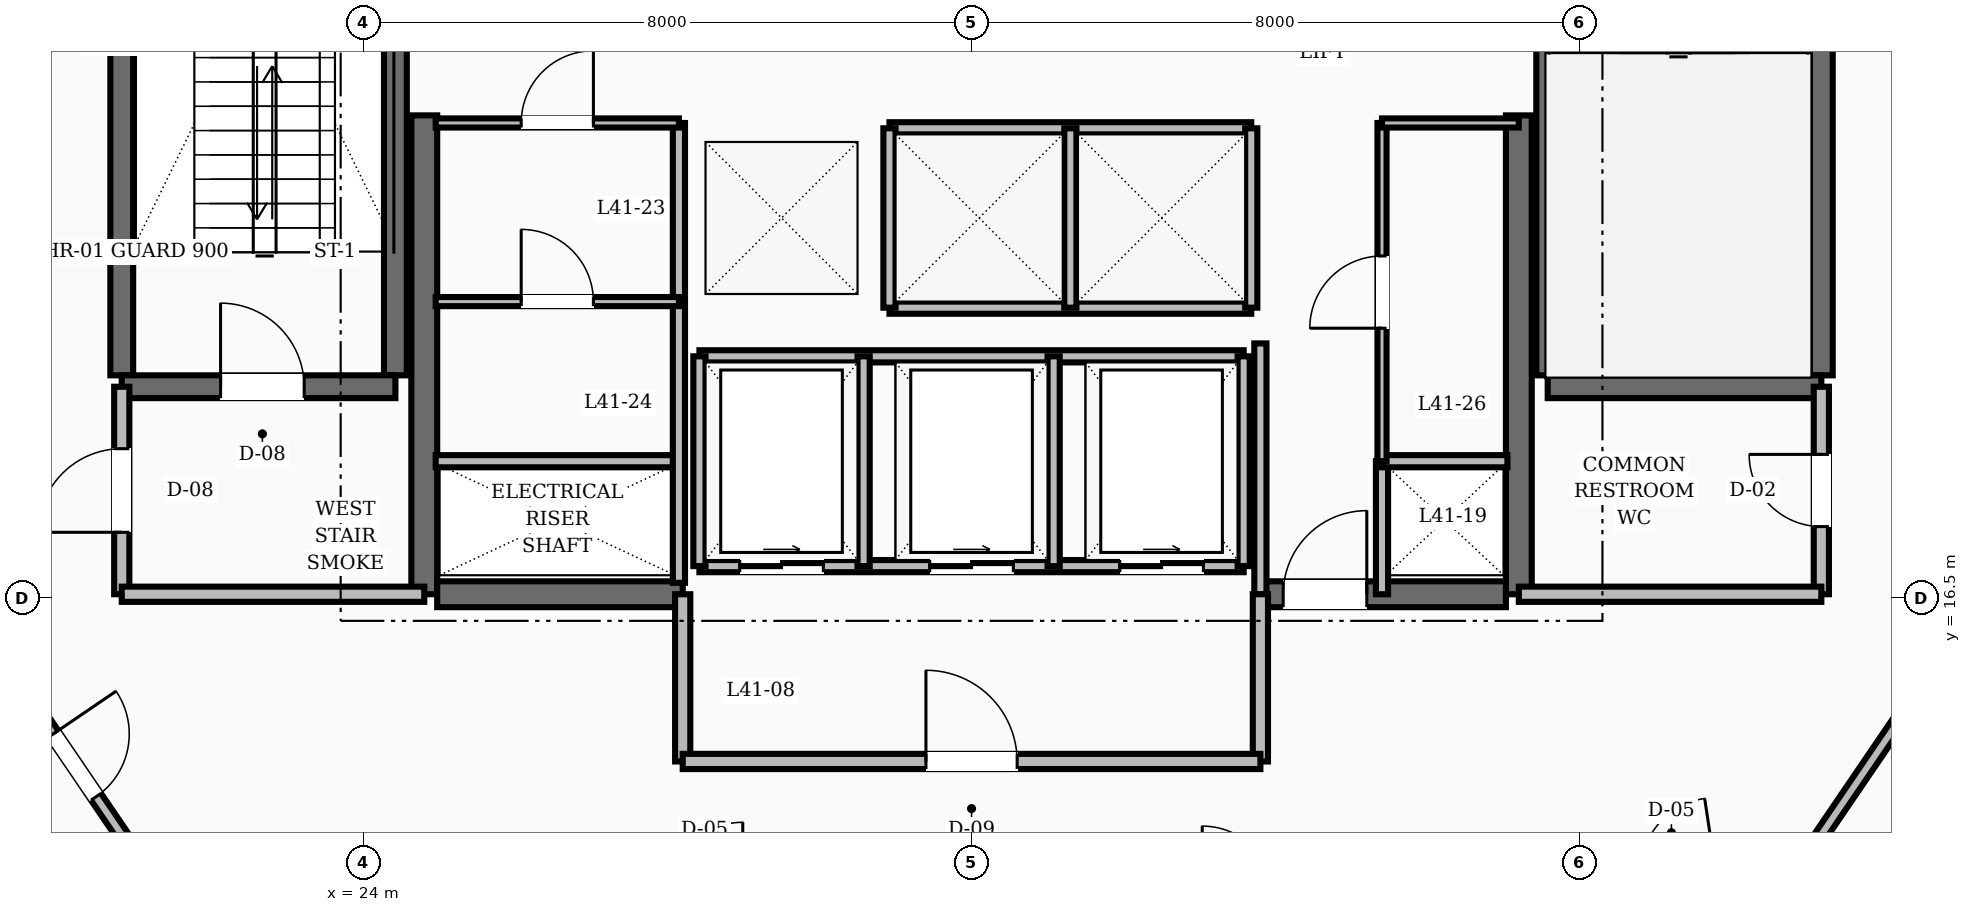
"""IFC4 building model, lengths in metres.
Left out: names, types, materials, properties, quantities, classifications, styles, units other than length and angle.
Written with IfcOpenShell. Run it as: python <this file> out.ifc"""

import sys

from ifc_helpers import new_model, si_unit, direction, frame, frame_2d, origin, place, context, subcontext, project, spatial, rectangle, extrude, element, fill, save


model = new_model("IFC4")
c1 = context("Model", 3, precision=1e-05, world=origin(), true_north=direction((0.0, 1.0)))
c2 = subcontext(c1, "Body", "Model", "MODEL_VIEW")
j1 = project(units=[si_unit("LENGTHUNIT", "METRE"), si_unit("PLANEANGLEUNIT", "RADIAN")], contexts=[c1])
p1 = place(None, origin())
s1 = spatial("IfcSite", under=j1, at=p1, CompositionType="ELEMENT")
p2 = place(p1, origin())
s2 = spatial("IfcBuilding", under=s1, at=p2, CompositionType="ELEMENT")
p3 = place(p2, frame((0.0, 0.0, 160.4)))
s3 = spatial("IfcBuildingStorey", under=s2, at=p3, CompositionType="ELEMENT", Elevation=160.4)
for number, where, z_axis, x_axis in (
    (1, (24.8, 16.55, 0.0), (0.0, 0.0, 1.0), (0.0, 1.0, 0.0)),
    (2, (39.2, 16.55, 0.0), (0.0, 0.0, 1.0), (0.0, 1.0, 0.0)),
):
    element("IfcWall", number, at=place(p3, frame(where, z_axis=z_axis, x_axis=x_axis)), inside=s3, PredefinedType="SHEAR", context=c2, shape_type="SweptSolid", body=[
        extrude(rectangle(XDim=6.3, YDim=0.34, at=frame_2d((3.15, 0.0))), origin(), (0.0, 0.0, 1.0), 3.6),
    ])
p4 = place(p3, frame((24.97, 16.55, 0.0), z_axis=(0.0, 0.0, 1.0), x_axis=(1.0, 0.0, 0.0)))
e3 = element("IfcWall", 3, at=p4, inside=s3, PredefinedType="SHEAR", context=c2, shape_type="SweptSolid", body=[
    extrude(rectangle(XDim=3.23, YDim=0.34, at=frame_2d((1.615, 0.0))), origin(), (0.0, 0.0, 1.0), 3.6),
])
p5 = place(p3, frame((35.8, 16.55, 0.0), z_axis=(0.0, 0.0, 1.0), x_axis=(1.0, 0.0, 0.0)))
e4 = element("IfcWall", 4, at=p5, inside=s3, PredefinedType="SHEAR", context=c2, shape_type="SweptSolid", body=[
    extrude(rectangle(XDim=3.23, YDim=0.34, at=frame_2d((1.615, 0.0))), origin(), (0.0, 0.0, 1.0), 3.6),
])
p6 = place(p5, frame((0.3, 0.0, 0.0)))
e5 = element("IfcOpeningElement", 5, at=p6, cuts=e4, PredefinedType="OPENING", context=c2, shape_type="SweptSolid", body=[
    extrude(rectangle(XDim=1.1, YDim=2.1, at=frame_2d((0.55, 1.05))), frame((0.0, 0.18, 0.0), z_axis=(0.0, -1.0, 0.0), x_axis=(1.0, 0.0, 0.0)), (0.0, 0.0, 1.0), 0.36),
])
for number, where, z_axis, x_axis in (
    (6, (20.82, 19.43, 0.0), (0.0, 0.0, 1.0), (0.0, 1.0, 0.0)),
    (7, (24.42, 19.43, 0.0), (0.0, 0.0, 1.0), (0.0, 1.0, 0.0)),
):
    element("IfcWall", number, at=place(p3, frame(where, z_axis=z_axis, x_axis=x_axis)), inside=s3, PredefinedType="SHEAR", context=c2, shape_type="SweptSolid", body=[
        extrude(rectangle(XDim=8.74, YDim=0.3, at=frame_2d((4.37, 0.0))), origin(), (0.0, 0.0, 1.0), 3.6),
    ])
p7 = place(p3, frame((20.82, 19.28, 0.0), z_axis=(0.0, 0.0, 1.0), x_axis=(1.0, 0.0, 0.0)))
e8 = element("IfcWall", 8, at=p7, inside=s3, PredefinedType="SHEAR", context=c2, shape_type="SweptSolid", body=[
    extrude(rectangle(XDim=3.6, YDim=0.3, at=frame_2d((1.8, 0.0))), origin(), (0.0, 0.0, 1.0), 3.6),
])
p8 = place(p7, frame((1.3, 0.0, 0.0)))
e9 = element("IfcOpeningElement", 9, at=p8, cuts=e8, PredefinedType="OPENING", context=c2, shape_type="SweptSolid", body=[
    extrude(rectangle(XDim=1.1, YDim=2.1, at=frame_2d((0.55, 1.05))), frame((0.0, 0.16, 0.0), z_axis=(0.0, -1.0, 0.0), x_axis=(1.0, 0.0, 0.0)), (0.0, 0.0, 1.0), 0.32),
])
for number, where, z_axis, x_axis in (
    (10, (43.18, 19.43, 0.0), (0.0, 0.0, 1.0), (0.0, 1.0, 0.0)),
    (11, (39.58, 19.43, 0.0), (0.0, 0.0, 1.0), (0.0, 1.0, 0.0)),
):
    element("IfcWall", number, at=place(p3, frame(where, z_axis=z_axis, x_axis=x_axis)), inside=s3, PredefinedType="SHEAR", context=c2, shape_type="SweptSolid", body=[
        extrude(rectangle(XDim=8.74, YDim=0.3, at=frame_2d((4.37, 0.0))), origin(), (0.0, 0.0, 1.0), 3.6),
    ])
p9 = place(p3, frame((39.58, 19.28, 0.0), z_axis=(0.0, 0.0, 1.0), x_axis=(1.0, 0.0, 0.0)))
e12 = element("IfcWall", 12, at=p9, inside=s3, PredefinedType="SHEAR", context=c2, shape_type="SweptSolid", body=[
    extrude(rectangle(XDim=3.6, YDim=0.3, at=frame_2d((1.8, 0.0))), origin(), (0.0, 0.0, 1.0), 3.6),
])
p10 = place(p3, frame((20.82, 16.55, 0.0), z_axis=(0.0, 0.0, 1.0), x_axis=(0.0, 1.0, 0.0)))
e13 = element("IfcWall", 13, at=p10, inside=s3, PredefinedType="SOLIDWALL", context=c2, shape_type="SweptSolid", body=[
    extrude(rectangle(XDim=2.73, YDim=0.2, at=frame_2d((1.365, 0.0))), origin(), (0.0, 0.0, 1.0), 2.8),
])
p11 = place(p10, frame((0.815, 0.0, 0.0)))
e14 = element("IfcOpeningElement", 14, at=p11, cuts=e13, PredefinedType="OPENING", context=c2, shape_type="SweptSolid", body=[
    extrude(rectangle(XDim=1.1, YDim=2.1, at=frame_2d((0.55, 1.05))), frame((0.0, 0.11, 0.0), z_axis=(0.0, -1.0, 0.0), x_axis=(1.0, 0.0, 0.0)), (0.0, 0.0, 1.0), 0.22),
])
p12 = place(p3, frame((20.82, 16.55, 0.0), z_axis=(0.0, 0.0, 1.0), x_axis=(1.0, 0.0, 0.0)))
e15 = element("IfcWall", 15, at=p12, inside=s3, PredefinedType="SOLIDWALL", context=c2, shape_type="SweptSolid", body=[
    extrude(rectangle(XDim=3.98, YDim=0.2, at=frame_2d((1.99, 0.0))), origin(), (0.0, 0.0, 1.0), 2.8),
])
p13 = place(p3, frame((43.18, 16.55, 0.0), z_axis=(0.0, 0.0, 1.0), x_axis=(0.0, 1.0, 0.0)))
e16 = element("IfcWall", 16, at=p13, inside=s3, PredefinedType="SOLIDWALL", context=c2, shape_type="SweptSolid", body=[
    extrude(rectangle(XDim=2.73, YDim=0.2, at=frame_2d((1.365, 0.0))), origin(), (0.0, 0.0, 1.0), 2.8),
])
p14 = place(p13, frame((0.89, 0.0, 0.0)))
e17 = element("IfcOpeningElement", 17, at=p14, cuts=e16, PredefinedType="OPENING", context=c2, shape_type="SweptSolid", body=[
    extrude(rectangle(XDim=0.95, YDim=2.1, at=frame_2d((0.475, 1.05))), frame((0.0, 0.11, 0.0), z_axis=(0.0, -1.0, 0.0), x_axis=(1.0, 0.0, 0.0)), (0.0, 0.0, 1.0), 0.22),
])
p15 = place(p3, frame((39.2, 16.55, 0.0), z_axis=(0.0, 0.0, 1.0), x_axis=(1.0, 0.0, 0.0)))
e18 = element("IfcWall", 18, at=p15, inside=s3, PredefinedType="SOLIDWALL", context=c2, shape_type="SweptSolid", body=[
    extrude(rectangle(XDim=3.98, YDim=0.2, at=frame_2d((1.99, 0.0))), origin(), (0.0, 0.0, 1.0), 2.8),
])
p16 = place(p3, frame((35.8, 16.55, 0.0), z_axis=(0.0, 0.0, 1.0), x_axis=(0.0, 1.0, 0.0)))
e19 = element("IfcWall", 19, at=p16, inside=s3, PredefinedType="SOLIDWALL", context=c2, shape_type="SweptSolid", body=[
    extrude(rectangle(XDim=3.3, YDim=0.16, at=frame_2d((1.65, 0.0))), origin(), (0.0, 0.0, 1.0), 2.8),
])
p17 = place(p3, frame((37.4, 16.55, 0.0), z_axis=(0.0, 0.0, 1.0), x_axis=(0.0, 1.0, 0.0)))
e20 = element("IfcWall", 20, at=p17, inside=s3, PredefinedType="SOLIDWALL", context=c2, shape_type="SweptSolid", body=[
    extrude(rectangle(XDim=1.75, YDim=0.16, at=frame_2d((0.875, 0.0))), origin(), (0.0, 0.0, 1.0), 2.8),
])
for number, where, z_axis, x_axis in (
    (21, (28.2, 14.35, 0.0), (0.0, 0.0, 1.0), (0.0, 1.0, 0.0)),
    (22, (35.8, 14.35, 0.0), (0.0, 0.0, 1.0), (0.0, 1.0, 0.0)),
):
    element("IfcWall", number, at=place(p3, frame(where, z_axis=z_axis, x_axis=x_axis)), inside=s3, PredefinedType="SOLIDWALL", context=c2, shape_type="SweptSolid", body=[
        extrude(rectangle(XDim=2.2, YDim=0.2, at=frame_2d((1.1, 0.0))), origin(), (0.0, 0.0, 1.0), 2.8),
    ])
p18 = place(p3, frame((28.2, 14.35, 0.0), z_axis=(0.0, 0.0, 1.0), x_axis=(1.0, 0.0, 0.0)))
e23 = element("IfcWall", 23, at=p18, inside=s3, PredefinedType="SOLIDWALL", context=c2, shape_type="SweptSolid", body=[
    extrude(rectangle(XDim=7.6, YDim=0.2, at=frame_2d((3.8, 0.0))), origin(), (0.0, 0.0, 1.0), 2.8),
])
p19 = place(p18, frame((3.2, 0.0, 0.0)))
e24 = element("IfcOpeningElement", 24, at=p19, cuts=e23, PredefinedType="OPENING", context=c2, shape_type="SweptSolid", body=[
    extrude(rectangle(XDim=1.2, YDim=2.1, at=frame_2d((0.6, 1.05))), frame((0.0, 0.11, 0.0), z_axis=(0.0, -1.0, 0.0), x_axis=(1.0, 0.0, 0.0)), (0.0, 0.0, 1.0), 0.22),
])
for number, where, z_axis, x_axis in (
    (25, (30.92, 22.68, 0.0), (0.0, 0.0, 1.0), (1.0, 0.0, 0.0)),
    (26, (30.92, 20.32, 0.0), (0.0, 0.0, 1.0), (1.0, 0.0, 0.0)),
):
    element("IfcWall", number, at=place(p3, frame(where, z_axis=z_axis, x_axis=x_axis)), inside=s3, PredefinedType="SOLIDWALL", context=c2, shape_type="SweptSolid", body=[
        extrude(rectangle(XDim=4.76, YDim=0.16, at=frame_2d((2.38, 0.0))), origin(), (0.0, 0.0, 1.0), 2.8),
    ])
for number, where, z_axis, x_axis in (
    (27, (30.92, 20.32, 0.0), (0.0, 0.0, 1.0), (0.0, 1.0, 0.0)),
    (28, (33.3, 20.32, 0.0), (0.0, 0.0, 1.0), (0.0, 1.0, 0.0)),
    (29, (35.68, 20.32, 0.0), (0.0, 0.0, 1.0), (0.0, 1.0, 0.0)),
):
    element("IfcWall", number, at=place(p3, frame(where, z_axis=z_axis, x_axis=x_axis)), inside=s3, PredefinedType="SOLIDWALL", context=c2, shape_type="SweptSolid", body=[
        extrude(rectangle(XDim=2.36, YDim=0.16, at=frame_2d((1.18, 0.0))), origin(), (0.0, 0.0, 1.0), 2.8),
    ])
p20 = place(p3, frame((28.42, 16.92, 0.0), z_axis=(0.0, 0.0, 1.0), x_axis=(1.0, 0.0, 0.0)))
e30 = element("IfcWall", 30, at=p20, inside=s3, PredefinedType="SOLIDWALL", context=c2, shape_type="SweptSolid", body=[
    extrude(rectangle(XDim=7.16, YDim=0.16, at=frame_2d((3.58, 0.0))), origin(), (0.0, 0.0, 1.0), 2.8),
])
p21 = place(p20, frame((0.53, 0.0, 0.0)))
e31 = element("IfcOpeningElement", 31, at=p21, cuts=e30, PredefinedType="OPENING", context=c2, shape_type="SweptSolid", body=[
    extrude(rectangle(XDim=1.1, YDim=2.15, at=frame_2d((0.55, 1.075))), frame((0.0, 0.09, 0.0), z_axis=(0.0, -1.0, 0.0), x_axis=(1.0, 0.0, 0.0)), (0.0, 0.0, 1.0), 0.18),
])
p22 = place(p20, frame((3.03, 0.0, 0.0)))
e32 = element("IfcOpeningElement", 32, at=p22, cuts=e30, PredefinedType="OPENING", context=c2, shape_type="SweptSolid", body=[
    extrude(rectangle(XDim=1.1, YDim=2.15, at=frame_2d((0.55, 1.075))), frame((0.0, 0.09, 0.0), z_axis=(0.0, -1.0, 0.0), x_axis=(1.0, 0.0, 0.0)), (0.0, 0.0, 1.0), 0.18),
])
p23 = place(p20, frame((5.53, 0.0, 0.0)))
e33 = element("IfcOpeningElement", 33, at=p23, cuts=e30, PredefinedType="OPENING", context=c2, shape_type="SweptSolid", body=[
    extrude(rectangle(XDim=1.1, YDim=2.15, at=frame_2d((0.55, 1.075))), frame((0.0, 0.09, 0.0), z_axis=(0.0, -1.0, 0.0), x_axis=(1.0, 0.0, 0.0)), (0.0, 0.0, 1.0), 0.18),
])
p24 = place(p3, frame((28.42, 19.68, 0.0), z_axis=(0.0, 0.0, 1.0), x_axis=(1.0, 0.0, 0.0)))
e34 = element("IfcWall", 34, at=p24, inside=s3, PredefinedType="SOLIDWALL", context=c2, shape_type="SweptSolid", body=[
    extrude(rectangle(XDim=7.16, YDim=0.16, at=frame_2d((3.58, 0.0))), origin(), (0.0, 0.0, 1.0), 2.8),
])
for number, where, z_axis, x_axis in (
    (35, (28.42, 16.92, 0.0), (0.0, 0.0, 1.0), (0.0, 1.0, 0.0)),
    (36, (30.58, 16.92, 0.0), (0.0, 0.0, 1.0), (0.0, 1.0, 0.0)),
    (37, (33.08, 16.92, 0.0), (0.0, 0.0, 1.0), (0.0, 1.0, 0.0)),
    (38, (35.58, 16.92, 0.0), (0.0, 0.0, 1.0), (0.0, 1.0, 0.0)),
):
    element("IfcWall", number, at=place(p3, frame(where, z_axis=z_axis, x_axis=x_axis)), inside=s3, PredefinedType="SOLIDWALL", context=c2, shape_type="SweptSolid", body=[
        extrude(rectangle(XDim=2.76, YDim=0.16, at=frame_2d((1.38, 0.0))), origin(), (0.0, 0.0, 1.0), 2.8),
    ])
p25 = place(p3, frame((24.95, 18.3, 0.0), z_axis=(0.0, 0.0, 1.0), x_axis=(1.0, 0.0, 0.0)))
e39 = element("IfcWall", 39, at=p25, inside=s3, PredefinedType="SOLIDWALL", context=c2, shape_type="SweptSolid", body=[
    extrude(rectangle(XDim=3.2, YDim=0.16, at=frame_2d((1.6, 0.0))), origin(), (0.0, 0.0, 1.0), 2.8),
])
p26 = place(p3, frame((28.15, 16.7, 0.0), z_axis=(0.0, 0.0, 1.0), x_axis=(0.0, 1.0, 0.0)))
e40 = element("IfcWall", 40, at=p26, inside=s3, PredefinedType="SOLIDWALL", context=c2, shape_type="SweptSolid", body=[
    extrude(rectangle(XDim=6.05, YDim=0.16, at=frame_2d((3.025, 0.0))), origin(), (0.0, 0.0, 1.0), 2.8),
])
p27 = place(p3, frame((37.4, 18.3, 0.0), z_axis=(0.0, 0.0, 1.0), x_axis=(1.0, 0.0, 0.0)))
e41 = element("IfcWall", 41, at=p27, inside=s3, PredefinedType="SOLIDWALL", context=c2, shape_type="SweptSolid", body=[
    extrude(rectangle(XDim=1.65, YDim=0.16, at=frame_2d((0.825, 0.0))), origin(), (0.0, 0.0, 1.0), 2.8),
])
p28 = place(p3, frame((24.95, 22.75, 0.0), z_axis=(0.0, 0.0, 1.0), x_axis=(1.0, 0.0, 0.0)))
e42 = element("IfcWall", 42, at=p28, inside=s3, PredefinedType="PARTITIONING", context=c2, shape_type="SweptSolid", body=[
    extrude(rectangle(XDim=3.2, YDim=0.12, at=frame_2d((1.6, 0.0))), origin(), (0.0, 0.0, 1.0), 2.8),
])
p29 = place(p28, frame((1.125, 0.0, 0.0)))
e43 = element("IfcOpeningElement", 43, at=p29, cuts=e42, PredefinedType="OPENING", context=c2, shape_type="SweptSolid", body=[
    extrude(rectangle(XDim=0.95, YDim=2.1, at=frame_2d((0.475, 1.05))), frame((0.0, 0.07, 0.0), z_axis=(0.0, -1.0, 0.0), x_axis=(1.0, 0.0, 0.0)), (0.0, 0.0, 1.0), 0.14),
])
p30 = place(p3, frame((37.4, 18.3, 0.0), z_axis=(0.0, 0.0, 1.0), x_axis=(0.0, 1.0, 0.0)))
e44 = element("IfcWall", 44, at=p30, inside=s3, PredefinedType="PARTITIONING", context=c2, shape_type="SweptSolid", body=[
    extrude(rectangle(XDim=4.45, YDim=0.12, at=frame_2d((2.225, 0.0))), origin(), (0.0, 0.0, 1.0), 2.8),
])
p31 = place(p30, frame((1.75, 0.0, 0.0)))
e45 = element("IfcOpeningElement", 45, at=p31, cuts=e44, PredefinedType="OPENING", context=c2, shape_type="SweptSolid", body=[
    extrude(rectangle(XDim=0.95, YDim=2.1, at=frame_2d((0.475, 1.05))), frame((0.0, 0.07, 0.0), z_axis=(0.0, -1.0, 0.0), x_axis=(1.0, 0.0, 0.0)), (0.0, 0.0, 1.0), 0.14),
])
p32 = place(p3, frame((37.4, 22.75, 0.0), z_axis=(0.0, 0.0, 1.0), x_axis=(1.0, 0.0, 0.0)))
e46 = element("IfcWall", 46, at=p32, inside=s3, PredefinedType="PARTITIONING", context=c2, shape_type="SweptSolid", body=[
    extrude(rectangle(XDim=1.8, YDim=0.12, at=frame_2d((0.9, 0.0))), origin(), (0.0, 0.0, 1.0), 2.8),
])
p33 = place(p3, frame((24.95, 20.4, 0.0), z_axis=(0.0, 0.0, 1.0), x_axis=(1.0, 0.0, 0.0)))
e47 = element("IfcWall", 47, at=p33, inside=s3, PredefinedType="PARTITIONING", context=c2, shape_type="SweptSolid", body=[
    extrude(rectangle(XDim=3.2, YDim=0.12, at=frame_2d((1.6, 0.0))), origin(), (0.0, 0.0, 1.0), 2.8),
])
p34 = place(p33, frame((1.125, 0.0, 0.0)))
e48 = element("IfcOpeningElement", 48, at=p34, cuts=e47, PredefinedType="OPENING", context=c2, shape_type="SweptSolid", body=[
    extrude(rectangle(XDim=0.95, YDim=2.1, at=frame_2d((0.475, 1.05))), frame((0.0, 0.07, 0.0), z_axis=(0.0, -1.0, 0.0), x_axis=(1.0, 0.0, 0.0)), (0.0, 0.0, 1.0), 0.14),
])
p35 = place(p3, frame((19.35, 15.548, 0.0), z_axis=(0.0, 0.0, 1.0), x_axis=(0.562674669208, -0.826678423955, 0.0)))
e49 = element("IfcWall", 49, at=p35, inside=s3, PredefinedType="SOLIDWALL", context=c2, shape_type="SweptSolid", body=[
    extrude(rectangle(XDim=3.021, YDim=0.16, at=frame_2d((1.511, 0.0))), origin(), (0.0, 0.0, 1.0), 2.8),
])
p36 = place(p35, frame((1.01, 0.0, 0.0)))
e50 = element("IfcOpeningElement", 50, at=p36, cuts=e49, PredefinedType="OPENING", context=c2, shape_type="SweptSolid", body=[
    extrude(rectangle(XDim=1.0, YDim=2.1, at=frame_2d((0.5, 1.05))), frame((0.0, 0.09, 0.0), z_axis=(0.0, -1.0, 0.0), x_axis=(1.0, 0.0, 0.0)), (0.0, 0.0, 1.0), 0.18),
])
p37 = place(p3, frame((42.95, 13.05, 0.0), z_axis=(0.0, 0.0, 1.0), x_axis=(0.562674669208, 0.826678423955, 0.0)))
e51 = element("IfcWall", 51, at=p37, inside=s3, PredefinedType="SOLIDWALL", context=c2, shape_type="SweptSolid", body=[
    extrude(rectangle(XDim=3.021, YDim=0.16, at=frame_2d((1.511, 0.0))), origin(), (0.0, 0.0, 1.0), 2.8),
])
p38 = place(p8, origin())
e52 = element("IfcDoor", 52, at=p38, inside=s3, OperationType="SINGLE_SWING_LEFT", PredefinedType="DOOR", context=c2, shape_type="SweptSolid", body=[
    extrude(rectangle(XDim=1.1, YDim=2.1, at=frame_2d((0.55, 1.05))), frame((0.0, 0.025, 0.0), z_axis=(0.0, -1.0, 0.0), x_axis=(1.0, 0.0, 0.0)), (0.0, 0.0, 1.0), 0.05),
])
fill(e9, e52)
p39 = place(p11, origin())
e53 = element("IfcDoor", 53, at=p39, inside=s3, OperationType="SINGLE_SWING_LEFT", PredefinedType="DOOR", context=c2, shape_type="SweptSolid", body=[
    extrude(rectangle(XDim=1.1, YDim=2.1, at=frame_2d((0.55, 1.05))), frame((0.0, 0.025, 0.0), z_axis=(0.0, -1.0, 0.0), x_axis=(1.0, 0.0, 0.0)), (0.0, 0.0, 1.0), 0.05),
])
fill(e14, e53)
p40 = place(p14, origin())
e54 = element("IfcDoor", 54, at=p40, inside=s3, OperationType="SINGLE_SWING_RIGHT", PredefinedType="DOOR", context=c2, shape_type="SweptSolid", body=[
    extrude(rectangle(XDim=0.95, YDim=2.1, at=frame_2d((0.475, 1.05))), frame((0.0, 0.025, 0.0), z_axis=(0.0, -1.0, 0.0), x_axis=(1.0, 0.0, 0.0)), (0.0, 0.0, 1.0), 0.05),
])
fill(e17, e54)
p41 = place(p6, origin())
e55 = element("IfcDoor", 55, at=p41, inside=s3, OperationType="SINGLE_SWING_RIGHT", PredefinedType="DOOR", context=c2, shape_type="SweptSolid", body=[
    extrude(rectangle(XDim=1.1, YDim=2.1, at=frame_2d((0.55, 1.05))), frame((0.0, 0.025, 0.0), z_axis=(0.0, -1.0, 0.0), x_axis=(1.0, 0.0, 0.0)), (0.0, 0.0, 1.0), 0.05),
])
fill(e5, e55)
p42 = place(p19, origin())
e56 = element("IfcDoor", 56, at=p42, inside=s3, OperationType="SINGLE_SWING_LEFT", PredefinedType="DOOR", context=c2, shape_type="SweptSolid", body=[
    extrude(rectangle(XDim=1.2, YDim=2.1, at=frame_2d((0.6, 1.05))), frame((0.0, 0.025, 0.0), z_axis=(0.0, -1.0, 0.0), x_axis=(1.0, 0.0, 0.0)), (0.0, 0.0, 1.0), 0.05),
])
fill(e24, e56)
p43 = place(p21, origin())
e57 = element("IfcDoor", 57, at=p43, inside=s3, OperationType="SLIDING_TO_RIGHT", PredefinedType="DOOR", context=c2, shape_type="SweptSolid", body=[
    extrude(rectangle(XDim=1.1, YDim=2.15, at=frame_2d((0.55, 1.075))), frame((0.0, 0.025, 0.0), z_axis=(0.0, -1.0, 0.0), x_axis=(1.0, 0.0, 0.0)), (0.0, 0.0, 1.0), 0.05),
])
fill(e31, e57)
p44 = place(p22, origin())
e58 = element("IfcDoor", 58, at=p44, inside=s3, OperationType="SLIDING_TO_RIGHT", PredefinedType="DOOR", context=c2, shape_type="SweptSolid", body=[
    extrude(rectangle(XDim=1.1, YDim=2.15, at=frame_2d((0.55, 1.075))), frame((0.0, 0.025, 0.0), z_axis=(0.0, -1.0, 0.0), x_axis=(1.0, 0.0, 0.0)), (0.0, 0.0, 1.0), 0.05),
])
fill(e32, e58)
p45 = place(p23, origin())
e59 = element("IfcDoor", 59, at=p45, inside=s3, OperationType="SLIDING_TO_RIGHT", PredefinedType="DOOR", context=c2, shape_type="SweptSolid", body=[
    extrude(rectangle(XDim=1.1, YDim=2.15, at=frame_2d((0.55, 1.075))), frame((0.0, 0.025, 0.0), z_axis=(0.0, -1.0, 0.0), x_axis=(1.0, 0.0, 0.0)), (0.0, 0.0, 1.0), 0.05),
])
fill(e33, e59)
p46 = place(p29, origin())
e60 = element("IfcDoor", 60, at=p46, inside=s3, OperationType="SINGLE_SWING_RIGHT", PredefinedType="DOOR", context=c2, shape_type="SweptSolid", body=[
    extrude(rectangle(XDim=0.95, YDim=2.1, at=frame_2d((0.475, 1.05))), frame((0.0, 0.025, 0.0), z_axis=(0.0, -1.0, 0.0), x_axis=(1.0, 0.0, 0.0)), (0.0, 0.0, 1.0), 0.05),
])
fill(e43, e60)
p47 = place(p34, origin())
e61 = element("IfcDoor", 61, at=p47, inside=s3, OperationType="SINGLE_SWING_LEFT", PredefinedType="DOOR", context=c2, shape_type="SweptSolid", body=[
    extrude(rectangle(XDim=0.95, YDim=2.1, at=frame_2d((0.475, 1.05))), frame((0.0, 0.025, 0.0), z_axis=(0.0, -1.0, 0.0), x_axis=(1.0, 0.0, 0.0)), (0.0, 0.0, 1.0), 0.05),
])
fill(e48, e61)
p48 = place(p31, origin())
e62 = element("IfcDoor", 62, at=p48, inside=s3, OperationType="SINGLE_SWING_LEFT", PredefinedType="DOOR", context=c2, shape_type="SweptSolid", body=[
    extrude(rectangle(XDim=0.95, YDim=2.1, at=frame_2d((0.475, 1.05))), frame((0.0, 0.025, 0.0), z_axis=(0.0, -1.0, 0.0), x_axis=(1.0, 0.0, 0.0)), (0.0, 0.0, 1.0), 0.05),
])
fill(e45, e62)
p49 = place(p36, origin())
e63 = element("IfcDoor", 63, at=p49, inside=s3, OperationType="SINGLE_SWING_LEFT", PredefinedType="DOOR", context=c2, shape_type="SweptSolid", body=[
    extrude(rectangle(XDim=1.0, YDim=2.1, at=frame_2d((0.5, 1.05))), frame((0.0, 0.025, 0.0), z_axis=(0.0, -1.0, 0.0), x_axis=(1.0, 0.0, 0.0)), (0.0, 0.0, 1.0), 0.05),
])
fill(e50, e63)
save(model, sys.argv[1])
